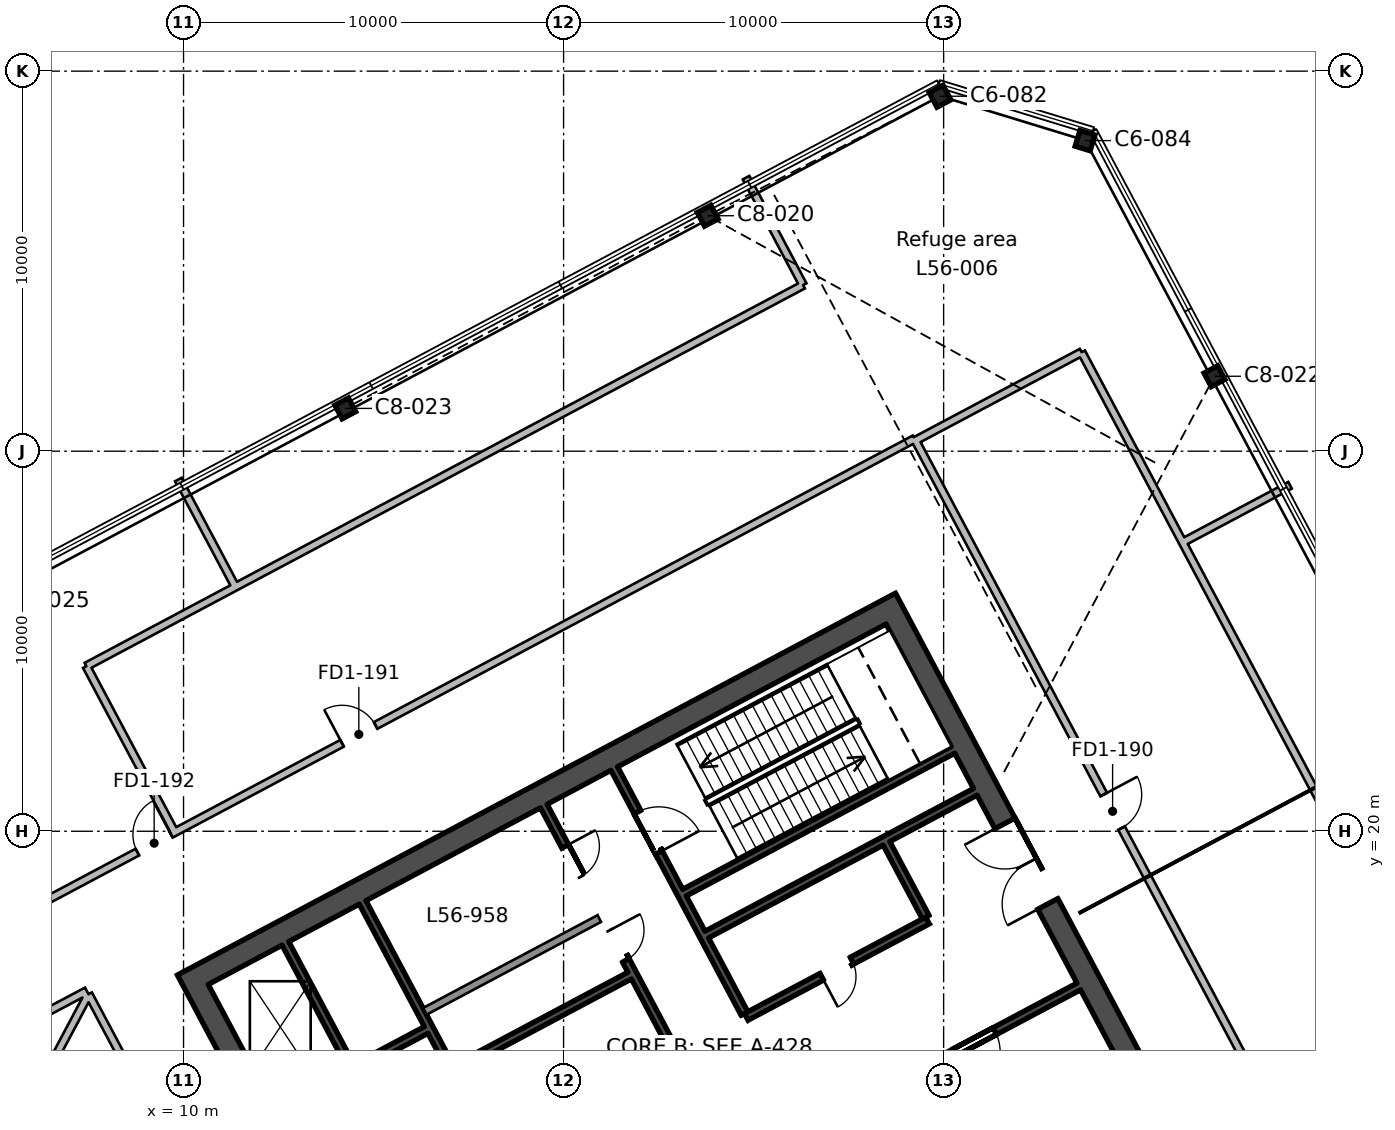
"""IFC4 building model, lengths in metres.
Left out: names, types, materials, properties, quantities, classifications, styles, units other than length and angle.
Written with IfcOpenShell. Run it as: python <this file> out.ifc"""

import sys

from ifc_helpers import new_model, si_unit, direction, frame, frame_2d, origin, origin_2d, place, context, subcontext, project, spatial, rectangle, i_section, extrude, element, fill, save


model = new_model("IFC4")
c1 = context("Model", 3, precision=1e-05, world=origin(), true_north=direction((0.0, 1.0)))
c2 = subcontext(c1, "Body", "Model", "MODEL_VIEW")
j1 = project(units=[si_unit("LENGTHUNIT", "METRE"), si_unit("PLANEANGLEUNIT", "RADIAN")], contexts=[c1])
p1 = place(None, origin())
s1 = spatial("IfcSite", under=j1, at=p1, CompositionType="ELEMENT")
p2 = place(p1, origin())
s2 = spatial("IfcBuilding", under=s1, at=p2, CompositionType="ELEMENT")
p3 = place(p2, frame((0.0, 0.0, 252.0)))
s3 = spatial("IfcBuildingStorey", under=s2, at=p3, CompositionType="ELEMENT", Elevation=252.0)
for number, where, z_axis, x_axis in (
    (1, (14.256, 31.126, 0.0), (0.0, 0.0, 1.0), (-0.883, -0.469, 0.0)),
    (2, (37.126, 31.972, 0.0), (0.0, 0.0, 1.0), (-0.469, 0.883, 0.0)),
    (3, (23.792, 36.196, 0.0), (0.0, 0.0, 1.0), (-0.883, -0.469, 0.0)),
):
    element("IfcColumn", number, at=place(p3, frame(where, z_axis=z_axis, x_axis=x_axis)), inside=s3, PredefinedType="COLUMN", context=c2, shape_type="SweptSolid", body=[
        extrude(i_section(OverallWidth=0.404, OverallDepth=0.406, WebThickness=0.027, FlangeThickness=0.044, FilletRadius=0.015, at=origin_2d()), origin(), (0.0, 0.0, 1.0), 6.0),
    ])
for number, where, z_axis, x_axis in (
    (4, (33.721, 38.173, 0.0), (0.0, 0.0, 1.0), (-0.956, 0.292, 0.0)),
    (5, (29.905, 39.34, 0.0), (0.0, 0.0, 1.0), (-0.883, -0.469, 0.0)),
):
    element("IfcColumn", number, at=place(p3, frame(where, z_axis=z_axis, x_axis=x_axis)), inside=s3, PredefinedType="COLUMN", context=c2, shape_type="SweptSolid", body=[
        extrude(i_section(OverallWidth=0.412, OverallDepth=0.434, WebThickness=0.036, FlangeThickness=0.057, FilletRadius=0.015, at=origin_2d()), origin(), (0.0, 0.0, 1.0), 6.0),
    ])
p4 = place(p3, frame((19.211, -0.771, 0.0), z_axis=(0.0, 0.0, 1.0), x_axis=(-0.469463742137, 0.882951751127, 0.0)))
e6 = element("IfcWall", 6, at=p4, inside=s3, PredefinedType="SHEAR", context=c2, shape_type="SweptSolid", body=[
    extrude(rectangle(XDim=19.4, YDim=0.6, at=frame_2d((9.7, 0.0))), origin(), (0.0, 0.0, 1.0), 6.0),
])
p5 = place(p4, frame((6.7, 0.0, 0.0)))
e7 = element("IfcOpeningElement", 7, at=p5, cuts=e6, PredefinedType="OPENING", context=c2, shape_type="SweptSolid", body=[
    extrude(rectangle(XDim=2.4, YDim=2.4, at=frame_2d((1.2, 1.2))), frame((0.0, 0.31, 0.0), z_axis=(0.0, -1.0, 0.0), x_axis=(1.0, 0.0, 0.0)), (0.0, 0.0, 1.0), 0.62),
])
p6 = place(p3, frame((37.576, 8.994, 0.0), z_axis=(0.0, 0.0, 1.0), x_axis=(-0.469478769487, 0.88294376095, 0.0)))
e8 = element("IfcWall", 8, at=p6, inside=s3, PredefinedType="SHEAR", context=c2, shape_type="SweptSolid", body=[
    extrude(rectangle(XDim=19.4, YDim=0.6, at=frame_2d((9.7, 0.0))), origin(), (0.0, 0.0, 1.0), 6.0),
])
p7 = place(p6, frame((10.3, 0.0, 0.0)))
e9 = element("IfcOpeningElement", 9, at=p7, cuts=e8, PredefinedType="OPENING", context=c2, shape_type="SweptSolid", body=[
    extrude(rectangle(XDim=2.4, YDim=2.4, at=frame_2d((1.2, 1.2))), frame((0.0, 0.31, 0.0), z_axis=(0.0, -1.0, 0.0), x_axis=(1.0, 0.0, 0.0)), (0.0, 0.0, 1.0), 0.62),
])
p8 = place(p3, frame((10.509, 16.234, 0.0), z_axis=(0.0, 0.0, 1.0), x_axis=(0.88295010195, 0.469466843842, 0.0)))
e10 = element("IfcWall", 10, at=p8, inside=s3, PredefinedType="SHEAR", context=c2, shape_type="SweptSolid", body=[
    extrude(rectangle(XDim=20.2, YDim=0.6, at=frame_2d((10.1, 0.0))), origin(), (0.0, 0.0, 1.0), 6.0),
])
p9 = place(p3, frame((14.394, 13.826, 0.0), z_axis=(0.0, 0.0, 1.0), x_axis=(-0.469494272526, 0.882935517501, 0.0)))
e11 = element("IfcWall", 11, at=p9, inside=s3, PredefinedType="SHEAR", context=c2, shape_type="SweptSolid", body=[
    extrude(rectangle(XDim=3.65, YDim=0.2, at=frame_2d((1.825, 0.0))), origin(), (0.0, 0.0, 1.0), 6.0),
])
p10 = place(p3, frame((18.138, 11.683, 0.0), z_axis=(0.0, 0.0, 1.0), x_axis=(-0.469480409012, 0.88294288918, 0.0)))
e12 = element("IfcWall", 12, at=p10, inside=s3, PredefinedType="SHEAR", context=c2, shape_type="SweptSolid", body=[
    extrude(rectangle(XDim=7.3, YDim=0.2, at=frame_2d((3.65, 0.0))), origin(), (0.0, 0.0, 1.0), 6.0),
])
p11 = place(p3, frame((22.906, 14.218, 0.0), z_axis=(0.0, 0.0, 1.0), x_axis=(-0.469480409012, 0.88294288918, 0.0)))
e13 = element("IfcWall", 13, at=p11, inside=s3, PredefinedType="SHEAR", context=c2, shape_type="SweptSolid", body=[
    extrude(rectangle(XDim=7.3, YDim=0.2, at=frame_2d((3.65, 0.0))), origin(), (0.0, 0.0, 1.0), 6.0),
])
p12 = place(p11, frame((2.7, 0.0, 0.0)))
e14 = element("IfcOpeningElement", 14, at=p12, cuts=e13, PredefinedType="OPENING", context=c2, shape_type="SweptSolid", body=[
    extrude(rectangle(XDim=0.9, YDim=2.1, at=frame_2d((0.45, 1.05))), frame((0.0, 0.11, 0.0), z_axis=(0.0, -1.0, 0.0), x_axis=(1.0, 0.0, 0.0)), (0.0, 0.0, 1.0), 0.22),
])
p13 = place(p11, frame((5.2, 0.0, 0.0)))
e15 = element("IfcOpeningElement", 15, at=p13, cuts=e13, PredefinedType="OPENING", context=c2, shape_type="SweptSolid", body=[
    extrude(rectangle(XDim=0.9, YDim=2.1, at=frame_2d((0.45, 1.05))), frame((0.0, 0.11, 0.0), z_axis=(0.0, -1.0, 0.0), x_axis=(1.0, 0.0, 0.0)), (0.0, 0.0, 1.0), 0.22),
])
p14 = place(p3, frame((24.76, 15.204, 0.0), z_axis=(0.0, 0.0, 1.0), x_axis=(-0.469494272526, 0.882935517501, 0.0)))
e16 = element("IfcWall", 16, at=p14, inside=s3, PredefinedType="SHEAR", context=c2, shape_type="SweptSolid", body=[
    extrude(rectangle(XDim=7.3, YDim=0.2, at=frame_2d((3.65, 0.0))), origin(), (0.0, 0.0, 1.0), 6.0),
])
p15 = place(p14, frame((4.8, 0.0, 0.0)))
e17 = element("IfcOpeningElement", 17, at=p15, cuts=e16, PredefinedType="OPENING", context=c2, shape_type="SweptSolid", body=[
    extrude(rectangle(XDim=1.2, YDim=2.1, at=frame_2d((0.6, 1.05))), frame((0.0, 0.11, 0.0), z_axis=(0.0, -1.0, 0.0), x_axis=(1.0, 0.0, 0.0)), (0.0, 0.0, 1.0), 0.22),
])
p16 = place(p3, frame((29.528, 17.739, 0.0), z_axis=(0.0, 0.0, 1.0), x_axis=(-0.469401318492, 0.882984938828, 0.0)))
e18 = element("IfcWall", 18, at=p16, inside=s3, PredefinedType="SHEAR", context=c2, shape_type="SweptSolid", body=[
    extrude(rectangle(XDim=2.2, YDim=0.2, at=frame_2d((1.1, 0.0))), origin(), (0.0, 0.0, 1.0), 6.0),
])
p17 = place(p3, frame((24.726, 11.222, 0.0), z_axis=(0.0, 0.0, 1.0), x_axis=(0.882940221191, 0.469485426614, 0.0)))
e19 = element("IfcWall", 19, at=p17, inside=s3, PredefinedType="SHEAR", context=c2, shape_type="SweptSolid", body=[
    extrude(rectangle(XDim=10.0, YDim=0.2, at=frame_2d((5.0, 0.0))), origin(), (0.0, 0.0, 1.0), 6.0),
])
p18 = place(p17, frame((6.3, 0.0, 0.0)))
e20 = element("IfcOpeningElement", 20, at=p18, cuts=e19, PredefinedType="OPENING", context=c2, shape_type="SweptSolid", body=[
    extrude(rectangle(XDim=1.2, YDim=2.1, at=frame_2d((0.6, 1.05))), frame((0.0, 0.11, 0.0), z_axis=(0.0, -1.0, 0.0), x_axis=(1.0, 0.0, 0.0)), (0.0, 0.0, 1.0), 0.22),
])
p19 = place(p17, frame((2.25, 0.0, 0.0)))
e21 = element("IfcOpeningElement", 21, at=p19, cuts=e19, PredefinedType="OPENING", context=c2, shape_type="SweptSolid", body=[
    extrude(rectangle(XDim=0.9, YDim=2.1, at=frame_2d((0.45, 1.05))), frame((0.0, 0.11, 0.0), z_axis=(0.0, -1.0, 0.0), x_axis=(1.0, 0.0, 0.0)), (0.0, 0.0, 1.0), 0.22),
])
p20 = place(p3, frame((24.807, 15.116, 0.0), z_axis=(0.0, 0.0, 1.0), x_axis=(0.882942972946, 0.469480251476, 0.0)))
e22 = element("IfcWall", 22, at=p20, inside=s3, PredefinedType="SHEAR", context=c2, shape_type="SweptSolid", body=[
    extrude(rectangle(XDim=5.4, YDim=0.2, at=frame_2d((2.7, 0.0))), origin(), (0.0, 0.0, 1.0), 6.0),
])
p21 = place(p20, frame((2.25, 0.0, 0.0)))
e23 = element("IfcOpeningElement", 23, at=p21, cuts=e22, PredefinedType="OPENING", context=c2, shape_type="SweptSolid", body=[
    extrude(rectangle(XDim=0.9, YDim=2.1, at=frame_2d((0.45, 1.05))), frame((0.0, 0.11, 0.0), z_axis=(0.0, -1.0, 0.0), x_axis=(1.0, 0.0, 0.0)), (0.0, 0.0, 1.0), 0.22),
])
p22 = place(p3, frame((17.147, 13.761, 0.0), z_axis=(0.0, 0.0, 1.0), x_axis=(0.882964314875, 0.469440111896, 0.0)))
e24 = element("IfcWall", 24, at=p22, inside=s3, PredefinedType="SHEAR", context=c2, shape_type="SweptSolid", body=[
    extrude(rectangle(XDim=5.2, YDim=0.2, at=frame_2d((2.6, 0.0))), origin(), (0.0, 0.0, 1.0), 6.0),
])
p23 = place(p3, frame((23.769, 17.282, 0.0), z_axis=(0.0, 0.0, 1.0), x_axis=(0.882940221191, 0.469485426614, 0.0)))
e25 = element("IfcWall", 25, at=p23, inside=s3, PredefinedType="SHEAR", context=c2, shape_type="SweptSolid", body=[
    extrude(rectangle(XDim=8.0, YDim=0.2, at=frame_2d((4.0, 0.0))), origin(), (0.0, 0.0, 1.0), 6.0),
])
p24 = place(p3, frame((12.41, 12.658, 0.0), z_axis=(0.0, 0.0, 1.0), x_axis=(0.8829484765, 0.469469900894, 0.0)))
e26 = element("IfcWall", 26, at=p24, inside=s3, PredefinedType="SHEAR", context=c2, shape_type="SweptSolid", body=[
    extrude(rectangle(XDim=4.5, YDim=0.2, at=frame_2d((2.25, 0.0))), origin(), (0.0, 0.0, 1.0), 6.0),
])
p25 = place(p24, frame((0.6, 0.0, 0.0)))
e27 = element("IfcOpeningElement", 27, at=p25, cuts=e26, PredefinedType="OPENING", context=c2, shape_type="SweptSolid", body=[
    extrude(rectangle(XDim=1.1, YDim=2.1, at=frame_2d((0.55, 1.05))), frame((0.0, 0.11, 0.0), z_axis=(0.0, -1.0, 0.0), x_axis=(1.0, 0.0, 0.0)), (0.0, 0.0, 1.0), 0.22),
])
p26 = place(p3, frame((23.182, 18.385, 0.0), z_axis=(0.0, 0.0, 1.0), x_axis=(0.88295287151, 0.469461634952, 0.0)))
e28 = element("IfcWall", 28, at=p26, inside=s3, PredefinedType="SHEAR", context=c2, shape_type="SweptSolid", body=[
    extrude(rectangle(XDim=8.0, YDim=0.2, at=frame_2d((4.0, 0.0))), origin(), (0.0, 0.0, 1.0), 6.0),
])
p27 = place(p3, frame((16.349, 15.262, 0.0), z_axis=(0.0, 0.0, 1.0), x_axis=(0.882953967957, 0.469459572775, 0.0)))
e29 = element("IfcWall", 29, at=p27, inside=s3, PredefinedType="SOLIDWALL", context=c2, shape_type="SweptSolid", body=[
    extrude(rectangle(XDim=5.2, YDim=0.2, at=frame_2d((2.6, 0.0))), origin(), (0.0, 0.0, 1.0), 6.0),
])
p28 = place(p3, frame((0.0, 14.78, 0.0), z_axis=(0.0, 0.0, 1.0), x_axis=(0.882955567988, 0.469456563443, 0.0)))
e30 = element("IfcWall", 30, at=p28, inside=s3, PredefinedType="PARTITIONING", context=c2, shape_type="SweptSolid", body=[
    extrude(rectangle(XDim=33.111, YDim=0.2, at=frame_2d((16.555, 0.0))), origin(), (0.0, 0.0, 1.0), 5.55),
])
p29 = place(p28, frame((16.05, 0.0, 0.0)))
e31 = element("IfcOpeningElement", 31, at=p29, cuts=e30, PredefinedType="OPENING", context=c2, shape_type="SweptSolid", body=[
    extrude(rectangle(XDim=1.0, YDim=2.1, at=frame_2d((0.5, 1.05))), frame((0.0, 0.11, 0.0), z_axis=(0.0, -1.0, 0.0), x_axis=(1.0, 0.0, 0.0)), (0.0, 0.0, 1.0), 0.22),
])
p30 = place(p28, frame((9.95, 0.0, 0.0)))
e32 = element("IfcOpeningElement", 32, at=p30, cuts=e30, PredefinedType="OPENING", context=c2, shape_type="SweptSolid", body=[
    extrude(rectangle(XDim=1.0, YDim=2.1, at=frame_2d((0.5, 1.05))), frame((0.0, 0.11, 0.0), z_axis=(0.0, -1.0, 0.0), x_axis=(1.0, 0.0, 0.0)), (0.0, 0.0, 1.0), 0.22),
])
p31 = place(p3, frame((7.501, 15.713, 0.0), z_axis=(0.0, 0.0, 1.0), x_axis=(-0.46948341094, -0.882941292982, 0.0)))
e33 = element("IfcWall", 33, at=p31, inside=s3, PredefinedType="PARTITIONING", context=c2, shape_type="SweptSolid", body=[
    extrude(rectangle(XDim=27.845, YDim=0.2, at=frame_2d((13.923, 0.0))), origin(), (0.0, 0.0, 1.0), 5.55),
])
p32 = place(p3, frame((0.0, 11.835, 0.0), z_axis=(0.0, 0.0, 1.0), x_axis=(0.882938953492, 0.469487810711, 0.0)))
e34 = element("IfcWall", 34, at=p32, inside=s3, PredefinedType="PARTITIONING", context=c2, shape_type="SweptSolid", body=[
    extrude(rectangle(XDim=8.443, YDim=0.2, at=frame_2d((4.222, 0.0))), origin(), (0.0, 0.0, 1.0), 5.55),
])
p33 = place(p3, frame((7.501, 15.713, 0.0), z_axis=(0.0, 0.0, 1.0), x_axis=(0.469480417329, -0.882942884758, 0.0)))
e35 = element("IfcWall", 35, at=p33, inside=s3, PredefinedType="PARTITIONING", context=c2, shape_type="SweptSolid", body=[
    extrude(rectangle(XDim=20.802, YDim=0.2, at=frame_2d((10.401, 0.0))), origin(), (0.0, 0.0, 1.0), 5.55),
])
p34 = place(p3, frame((11.355, 26.424, 0.0), z_axis=(0.0, 0.0, 1.0), x_axis=(-0.882846627183, -0.469661402366, 0.0)))
e36 = element("IfcWall", 36, at=p34, inside=s3, PredefinedType="PARTITIONING", context=c2, shape_type="SweptSolid", body=[
    extrude(rectangle(XDim=4.431, YDim=0.2, at=frame_2d((2.215, 0.0))), origin(), (0.0, 0.0, 1.0), 5.55),
])
p35 = place(p3, frame((7.443, 24.343, 0.0), z_axis=(0.0, 0.0, 1.0), x_axis=(0.46941874991, -0.882975671937, 0.0)))
e37 = element("IfcWall", 37, at=p35, inside=s3, PredefinedType="PARTITIONING", context=c2, shape_type="SweptSolid", body=[
    extrude(rectangle(XDim=4.899, YDim=0.2, at=frame_2d((2.45, 0.0))), origin(), (0.0, 0.0, 1.0), 5.55),
])
p36 = place(p3, frame((9.864, 29.255, 0.0), z_axis=(0.0, 0.0, 1.0), x_axis=(0.469447181805, -0.882960556025, 0.0)))
e38 = element("IfcWall", 38, at=p36, inside=s3, PredefinedType="PARTITIONING", context=c2, shape_type="SweptSolid", body=[
    extrude(rectangle(XDim=3.199, YDim=0.2, at=frame_2d((1.6, 0.0))), origin(), (0.0, 0.0, 1.0), 5.55),
])
p37 = place(p3, frame((11.355, 26.424, 0.0), z_axis=(0.0, 0.0, 1.0), x_axis=(0.882971344108, 0.469426890458, 0.0)))
e39 = element("IfcWall", 39, at=p37, inside=s3, PredefinedType="PARTITIONING", context=c2, shape_type="SweptSolid", body=[
    extrude(rectangle(XDim=16.929, YDim=0.2, at=frame_2d((8.465, 0.0))), origin(), (0.0, 0.0, 1.0), 5.55),
])
p38 = place(p3, frame((26.303, 34.371, 0.0), z_axis=(0.0, 0.0, 1.0), x_axis=(-0.46919425931, 0.883094981885, 0.0)))
e40 = element("IfcWall", 40, at=p38, inside=s3, PredefinedType="PARTITIONING", context=c2, shape_type="SweptSolid", body=[
    extrude(rectangle(XDim=3.201, YDim=0.2, at=frame_2d((1.601, 0.0))), origin(), (0.0, 0.0, 1.0), 5.55),
])
p39 = place(p3, frame((29.258, 30.282, 0.0), z_axis=(0.0, 0.0, 1.0), x_axis=(0.469478738977, -0.882943777173, 0.0)))
e41 = element("IfcWall", 41, at=p39, inside=s3, PredefinedType="PARTITIONING", context=c2, shape_type="SweptSolid", body=[
    extrude(rectangle(XDim=22.05, YDim=0.2, at=frame_2d((11.025, 0.0))), origin(), (0.0, 0.0, 1.0), 3.73),
])
p40 = place(p39, frame((10.551, 0.0, 0.0)))
e42 = element("IfcOpeningElement", 42, at=p40, cuts=e41, PredefinedType="OPENING", context=c2, shape_type="SweptSolid", body=[
    extrude(rectangle(XDim=1.0, YDim=2.1, at=frame_2d((0.5, 1.05))), frame((0.0, 0.11, 0.0), z_axis=(0.0, -1.0, 0.0), x_axis=(1.0, 0.0, 0.0)), (0.0, 0.0, 1.0), 0.22),
])
p41 = place(p3, frame((29.259, 30.281, 0.0), z_axis=(0.0, 0.0, 1.0), x_axis=(0.882951557948, 0.469464105463, 0.0)))
e43 = element("IfcWall", 43, at=p41, inside=s3, PredefinedType="PARTITIONING", context=c2, shape_type="SweptSolid", body=[
    extrude(rectangle(XDim=4.95, YDim=0.2, at=frame_2d((2.475, 0.0))), origin(), (0.0, 0.0, 1.0), 5.55),
])
p42 = place(p3, frame((33.63, 32.605, 0.0), z_axis=(0.0, 0.0, 1.0), x_axis=(0.469316317049, -0.883030120976, 0.0)))
e44 = element("IfcWall", 44, at=p42, inside=s3, PredefinedType="PARTITIONING", context=c2, shape_type="SweptSolid", body=[
    extrude(rectangle(XDim=5.651, YDim=0.2, at=frame_2d((2.825, 0.0))), origin(), (0.0, 0.0, 1.0), 5.55),
])
p43 = place(p3, frame((36.282, 27.615, 0.0), z_axis=(0.0, 0.0, 1.0), x_axis=(0.469478308665, -0.882944005978, 0.0)))
e45 = element("IfcWall", 45, at=p43, inside=s3, PredefinedType="PARTITIONING", context=c2, shape_type="SweptSolid", body=[
    extrude(rectangle(XDim=24.565, YDim=0.2, at=frame_2d((12.283, 0.0))), origin(), (0.0, 0.0, 1.0), 5.55),
])
p44 = place(p3, frame((39.115, 29.104, 0.0), z_axis=(0.0, 0.0, 1.0), x_axis=(-0.882834022315, -0.469685095616, 0.0)))
e46 = element("IfcWall", 46, at=p44, inside=s3, PredefinedType="PARTITIONING", context=c2, shape_type="SweptSolid", body=[
    extrude(rectangle(XDim=3.2, YDim=0.2, at=frame_2d((1.6, 0.0))), origin(), (0.0, 0.0, 1.0), 5.55),
])
p45 = place(p7, origin())
e47 = element("IfcDoor", 47, at=p45, inside=s3, OperationType="DOUBLE_DOOR_SINGLE_SWING", PredefinedType="DOOR", context=c2, shape_type="SweptSolid", body=[
    extrude(rectangle(XDim=2.4, YDim=2.4, at=frame_2d((1.2, 1.2))), frame((0.0, 0.025, 0.0), z_axis=(0.0, -1.0, 0.0), x_axis=(1.0, 0.0, 0.0)), (0.0, 0.0, 1.0), 0.05),
])
fill(e9, e47)
p46 = place(p18, frame((1.2, 0.0, 0.0), z_axis=(0.0, 0.0, 1.0), x_axis=(-1.0, 0.0, 0.0)))
e48 = element("IfcDoor", 48, at=p46, inside=s3, OperationType="SINGLE_SWING_RIGHT", PredefinedType="DOOR", context=c2, shape_type="SweptSolid", body=[
    extrude(rectangle(XDim=1.2, YDim=2.1, at=frame_2d((0.6, 1.05))), frame((0.0, 0.025, 0.0), z_axis=(0.0, -1.0, 0.0), x_axis=(1.0, 0.0, 0.0)), (0.0, 0.0, 1.0), 0.05),
])
fill(e20, e48)
p47 = place(p15, frame((1.2, 0.0, 0.0), z_axis=(0.0, 0.0, 1.0), x_axis=(-1.0, 0.0, 0.0)))
e49 = element("IfcDoor", 49, at=p47, inside=s3, OperationType="SINGLE_SWING_RIGHT", PredefinedType="DOOR", context=c2, shape_type="SweptSolid", body=[
    extrude(rectangle(XDim=1.2, YDim=2.1, at=frame_2d((0.6, 1.05))), frame((0.0, 0.025, 0.0), z_axis=(0.0, -1.0, 0.0), x_axis=(1.0, 0.0, 0.0)), (0.0, 0.0, 1.0), 0.05),
])
fill(e17, e49)
p48 = place(p21, frame((0.9, 0.0, 0.0), z_axis=(0.0, 0.0, 1.0), x_axis=(-1.0, 0.0, 0.0)))
e50 = element("IfcDoor", 50, at=p48, inside=s3, OperationType="SINGLE_SWING_RIGHT", PredefinedType="DOOR", context=c2, shape_type="SweptSolid", body=[
    extrude(rectangle(XDim=0.9, YDim=2.1, at=frame_2d((0.45, 1.05))), frame((0.0, 0.025, 0.0), z_axis=(0.0, -1.0, 0.0), x_axis=(1.0, 0.0, 0.0)), (0.0, 0.0, 1.0), 0.05),
])
fill(e23, e50)
p49 = place(p12, frame((0.9, 0.0, 0.0), z_axis=(0.0, 0.0, 1.0), x_axis=(-1.0, 0.0, 0.0)))
e51 = element("IfcDoor", 51, at=p49, inside=s3, OperationType="SINGLE_SWING_LEFT", PredefinedType="DOOR", context=c2, shape_type="SweptSolid", body=[
    extrude(rectangle(XDim=0.9, YDim=2.1, at=frame_2d((0.45, 1.05))), frame((0.0, 0.025, 0.0), z_axis=(0.0, -1.0, 0.0), x_axis=(1.0, 0.0, 0.0)), (0.0, 0.0, 1.0), 0.05),
])
fill(e14, e51)
p50 = place(p13, frame((0.9, 0.0, 0.0), z_axis=(0.0, 0.0, 1.0), x_axis=(-1.0, 0.0, 0.0)))
e52 = element("IfcDoor", 52, at=p50, inside=s3, OperationType="SINGLE_SWING_LEFT", PredefinedType="DOOR", context=c2, shape_type="SweptSolid", body=[
    extrude(rectangle(XDim=0.9, YDim=2.1, at=frame_2d((0.45, 1.05))), frame((0.0, 0.025, 0.0), z_axis=(0.0, -1.0, 0.0), x_axis=(1.0, 0.0, 0.0)), (0.0, 0.0, 1.0), 0.05),
])
fill(e15, e52)
p51 = place(p40, origin())
e53 = element("IfcDoor", 53, at=p51, inside=s3, OperationType="SINGLE_SWING_LEFT", PredefinedType="DOOR", context=c2, shape_type="SweptSolid", body=[
    extrude(rectangle(XDim=1.0, YDim=2.1, at=frame_2d((0.5, 1.05))), frame((0.0, 0.025, 0.0), z_axis=(0.0, -1.0, 0.0), x_axis=(1.0, 0.0, 0.0)), (0.0, 0.0, 1.0), 0.05),
])
fill(e42, e53)
p52 = place(p29, origin())
e54 = element("IfcDoor", 54, at=p52, inside=s3, OperationType="SINGLE_SWING_LEFT", PredefinedType="DOOR", context=c2, shape_type="SweptSolid", body=[
    extrude(rectangle(XDim=1.0, YDim=2.1, at=frame_2d((0.5, 1.05))), frame((0.0, 0.025, 0.0), z_axis=(0.0, -1.0, 0.0), x_axis=(1.0, 0.0, 0.0)), (0.0, 0.0, 1.0), 0.05),
])
fill(e31, e54)
p53 = place(p30, origin())
e55 = element("IfcDoor", 55, at=p53, inside=s3, OperationType="SINGLE_SWING_RIGHT", PredefinedType="DOOR", context=c2, shape_type="SweptSolid", body=[
    extrude(rectangle(XDim=1.0, YDim=2.1, at=frame_2d((0.5, 1.05))), frame((0.0, 0.025, 0.0), z_axis=(0.0, -1.0, 0.0), x_axis=(1.0, 0.0, 0.0)), (0.0, 0.0, 1.0), 0.05),
])
fill(e32, e55)
save(model, sys.argv[1])
